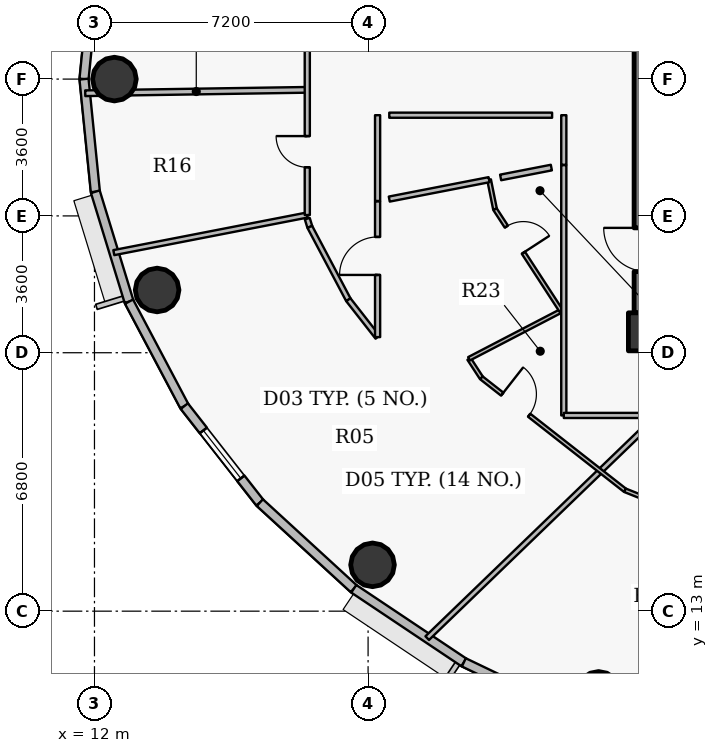
"""IFC4 building model, lengths in metres.
Left out: names, types, materials, properties, quantities, classifications, styles, units other than length and angle.
Written with IfcOpenShell. Run it as: python <this file> out.ifc"""

import sys

from ifc_helpers import new_model, si_unit, direction, frame, frame_2d, origin, origin_2d, place, context, subcontext, project, spatial, rectangle, hollow_circle, extrude, source, transform, mapped, element, fill, save


model = new_model("IFC4")
c1 = context("Model", 3, precision=1e-05, world=origin(), true_north=direction((0.0, 1.0)))
c2 = subcontext(c1, "Body", "Model", "MODEL_VIEW")
j1 = project(units=[si_unit("LENGTHUNIT", "METRE"), si_unit("PLANEANGLEUNIT", "RADIAN")], contexts=[c1])
p1 = place(None, origin())
s1 = spatial("IfcSite", under=j1, at=p1, CompositionType="ELEMENT")
p2 = place(p1, origin())
s2 = spatial("IfcBuilding", under=s1, at=p2, CompositionType="ELEMENT")
p3 = place(p2, frame((0.0, 0.0, 259.05)))
s3 = spatial("IfcBuildingStorey", under=s2, at=p3, CompositionType="ELEMENT", Elevation=259.05)
p4 = place(p3, frame((26.55, 20.35, 0.0), z_axis=(0.0, 0.0, 1.0), x_axis=(1.0, 0.0, 0.0)))
e1 = element("IfcColumn", 1, at=p4, inside=s3, PredefinedType="COLUMN", context=c2, shape_type="SweptSolid", body=[
    extrude(rectangle(XDim=1.0, YDim=1.0, at=origin_2d()), origin(), (0.0, 0.0, 1.0), 3.75),
])
p5 = place(p3, frame((26.55, 20.85, 0.0), z_axis=(0.0, 0.0, 1.0), x_axis=(0.0, 1.0, 0.0)))
e2 = element("IfcWall", 2, at=p5, inside=s3, PredefinedType="SHEAR", context=c2, shape_type="SweptSolid", body=[
    extrude(rectangle(XDim=12.3, YDim=0.7, at=frame_2d((6.15, 0.0))), origin(), (0.0, 0.0, 1.0), 3.0),
])
p6 = place(p5, frame((1.085, 0.0, 0.0)))
e3 = element("IfcOpeningElement", 3, at=p6, cuts=e2, PredefinedType="OPENING", context=c2, shape_type="SweptSolid", body=[
    extrude(rectangle(XDim=1.15, YDim=2.15, at=origin_2d()), frame((0.575, 0.36, 1.075), z_axis=(0.0, -1.0, 0.0), x_axis=(1.0, 0.0, 0.0)), (0.0, 0.0, 1.0), 0.72),
])
for number, where, z_axis, x_axis in (
    (4, (12.525, 27.0, 0.0), (0.0, 0.0, 1.0), (1.0, 0.0, 0.0)),
    (5, (13.649, 21.451, 0.0), (0.0, 0.0, 1.0), (1.0, 0.0, 0.0)),
    (6, (19.317, 14.219, 0.0), (0.0, 0.0, 1.0), (1.0, 0.0, 0.0)),
    (7, (25.265, 10.836, 0.0), (0.0, 0.0, 1.0), (1.0, 0.0, 0.0)),
):
    element("IfcColumn", number, at=place(p3, frame(where, z_axis=z_axis, x_axis=x_axis)), inside=s3, PredefinedType="COLUMN", context=c2, shape_type="SweptSolid", body=[
        extrude(hollow_circle(Radius=0.575, WallThickness=0.036, at=origin_2d()), origin(), (0.0, 0.0, 1.0), 3.75),
    ])
for number, where, z_axis, x_axis in (
    (8, (11.725, 27.0, 0.0), (0.0, 0.0, 1.0), (0.1, 0.995, 0.0)),
    (9, (12.023, 24.036, 0.0), (0.0, 0.0, 1.0), (-0.1, 0.995, 0.0)),
):
    element("IfcWall", number, at=place(p3, frame(where, z_axis=z_axis, x_axis=x_axis)), inside=s3, PredefinedType="SOLIDWALL", context=c2, shape_type="SweptSolid", body=[
        extrude(rectangle(XDim=2.979, YDim=0.24, at=frame_2d((1.489, 0.0))), origin(), (0.0, 0.0, 1.0), 3.45),
    ])
p7 = place(p3, frame((12.91, 21.144, 0.0), z_axis=(0.0, 0.0, 1.0), x_axis=(-0.293132907334, 0.95607170162, 0.0)))
e10 = element("IfcWall", 10, at=p7, inside=s3, PredefinedType="SOLIDWALL", context=c2, shape_type="SweptSolid", body=[
    extrude(rectangle(XDim=3.025, YDim=0.24, at=frame_2d((1.512, 0.0))), origin(), (0.0, 0.0, 1.0), 3.45),
])
p8 = place(p3, frame((14.364, 18.395, 0.0), z_axis=(0.0, 0.0, 1.0), x_axis=(-0.46766049993, 0.883908172157, 0.0)))
e11 = element("IfcWall", 11, at=p8, inside=s3, PredefinedType="SOLIDWALL", context=c2, shape_type="SweptSolid", body=[
    extrude(rectangle(XDim=3.11, YDim=0.24, at=frame_2d((1.555, 0.0))), origin(), (0.0, 0.0, 1.0), 3.45),
])
p9 = place(p3, frame((16.352, 15.855, 0.0), z_axis=(0.0, 0.0, 1.0), x_axis=(-0.616312344705, 0.787501805562, 0.0)))
e12 = element("IfcWall", 12, at=p9, inside=s3, PredefinedType="SOLIDWALL", context=c2, shape_type="SweptSolid", body=[
    extrude(rectangle(XDim=3.225, YDim=0.24, at=frame_2d((1.612, 0.0))), origin(), (0.0, 0.0, 1.0), 3.45),
])
p10 = place(p9, frame((0.812, 0.0, 0.9)))
e13 = element("IfcOpeningElement", 13, at=p10, cuts=e12, PredefinedType="OPENING", context=c2, shape_type="SweptSolid", body=[
    extrude(rectangle(XDim=1.6, YDim=1.75, at=origin_2d()), frame((0.8, 0.13, 0.875), z_axis=(0.0, -1.0, 0.0), x_axis=(1.0, 0.0, 0.0)), (0.0, 0.0, 1.0), 0.26),
])
p11 = place(p3, frame((18.824, 13.589, 0.0), z_axis=(0.0, 0.0, 1.0), x_axis=(-0.737123922599, 0.675757591694, 0.0)))
e14 = element("IfcWall", 14, at=p11, inside=s3, PredefinedType="SOLIDWALL", context=c2, shape_type="SweptSolid", body=[
    extrude(rectangle(XDim=3.354, YDim=0.24, at=frame_2d((1.677, 0.0))), origin(), (0.0, 0.0, 1.0), 3.45),
])
p12 = place(p3, frame((21.72, 11.652, 0.0), z_axis=(0.0, 0.0, 1.0), x_axis=(-0.831262496074, 0.555880079352, 0.0)))
e15 = element("IfcWall", 15, at=p12, inside=s3, PredefinedType="SOLIDWALL", context=c2, shape_type="SweptSolid", body=[
    extrude(rectangle(XDim=3.484, YDim=0.24, at=frame_2d((1.742, 0.0))), origin(), (0.0, 0.0, 1.0), 3.45),
])
p13 = place(p3, frame((24.969, 10.094, 0.0), z_axis=(0.0, 0.0, 1.0), x_axis=(-0.901598104751, 0.432574684313, 0.0)))
e16 = element("IfcWall", 16, at=p13, inside=s3, PredefinedType="SOLIDWALL", context=c2, shape_type="SweptSolid", body=[
    extrude(rectangle(XDim=3.604, YDim=0.24, at=frame_2d((1.802, 0.0))), origin(), (0.0, 0.0, 1.0), 3.45),
])
p14 = place(p3, frame((11.757, 26.628, 0.0), z_axis=(0.0, 0.0, 1.0), x_axis=(0.999882437841, 0.015333313333, 0.0)))
e17 = element("IfcWall", 17, at=p14, inside=s3, PredefinedType="PARTITIONING", context=c2, shape_type="SweptSolid", body=[
    extrude(rectangle(XDim=5.844, YDim=0.15, at=frame_2d((2.922, 0.0))), origin(), (0.0, 0.0, 1.0), 2.935),
])
p15 = place(p3, frame((12.509, 22.434, 0.0), z_axis=(0.0, 0.0, 1.0), x_axis=(0.981630821079, 0.190790280431, 0.0)))
e18 = element("IfcWall", 18, at=p15, inside=s3, PredefinedType="PARTITIONING", context=c2, shape_type="SweptSolid", body=[
    extrude(rectangle(XDim=5.186, YDim=0.135, at=frame_2d((2.593, 0.0))), origin(), (0.0, 0.0, 1.0), 2.935),
])
p16 = place(p3, frame((17.6, 23.328, 0.0), z_axis=(0.0, 0.0, 1.0), x_axis=(0.292875000845, -0.956150738053, 0.0)))
e19 = element("IfcWall", 19, at=p16, inside=s3, PredefinedType="PARTITIONING", context=c2, shape_type="SweptSolid", body=[
    extrude(rectangle(XDim=0.227, YDim=0.135, at=frame_2d((0.113, 0.0))), origin(), (0.0, 0.0, 1.0), 3.45),
])
p17 = place(p3, frame((17.6, 23.423, 0.0), z_axis=(0.0, 0.0, 1.0), x_axis=(0.0, 1.0, 0.0)))
e20 = element("IfcWall", 20, at=p17, inside=s3, PredefinedType="PARTITIONING", context=c2, shape_type="SweptSolid", body=[
    extrude(rectangle(XDim=4.527, YDim=0.135, at=frame_2d((2.263, 0.0))), origin(), (0.0, 0.0, 1.0), 2.885),
])
p18 = place(p17, frame((1.257, 0.0, 0.0)))
e21 = element("IfcOpeningElement", 21, at=p18, cuts=e20, PredefinedType="OPENING", context=c2, shape_type="SweptSolid", body=[
    extrude(rectangle(XDim=0.82, YDim=2.1, at=origin_2d()), frame((0.41, 0.078, 1.05), z_axis=(0.0, -1.0, 0.0), x_axis=(1.0, 0.0, 0.0)), (0.0, 0.0, 1.0), 0.155),
])
p19 = place(p3, frame((17.667, 23.111, 0.0), z_axis=(0.0, 0.0, 1.0), x_axis=(0.467675622269, -0.883900171024, 0.0)))
e22 = element("IfcWall", 22, at=p19, inside=s3, PredefinedType="PARTITIONING", context=c2, shape_type="SweptSolid", body=[
    extrude(rectangle(XDim=2.168, YDim=0.135, at=frame_2d((1.084, 0.0))), origin(), (0.0, 0.0, 1.0), 2.885),
])
p20 = place(p3, frame((18.681, 21.194, 0.0), z_axis=(0.0, 0.0, 1.0), x_axis=(0.616239706802, -0.787558647823, 0.0)))
e23 = element("IfcWall", 23, at=p20, inside=s3, PredefinedType="PARTITIONING", context=c2, shape_type="SweptSolid", body=[
    extrude(rectangle(XDim=1.248, YDim=0.135, at=frame_2d((0.624, 0.0))), origin(), (0.0, 0.0, 1.0), 3.45),
])
p21 = place(p3, frame((19.45, 20.211, 0.0), z_axis=(0.0, 0.0, 1.0), x_axis=(0.0, 1.0, 0.0)))
e24 = element("IfcWall", 24, at=p21, inside=s3, PredefinedType="PARTITIONING", context=c2, shape_type="SweptSolid", body=[
    extrude(rectangle(XDim=3.572, YDim=0.135, at=frame_2d((1.786, 0.0))), origin(), (0.0, 0.0, 1.0), 2.885),
])
p22 = place(p21, frame((1.636, 0.0, 0.0)))
e25 = element("IfcOpeningElement", 25, at=p22, cuts=e24, PredefinedType="OPENING", context=c2, shape_type="SweptSolid", body=[
    extrude(rectangle(XDim=1.0, YDim=2.15, at=origin_2d()), frame((0.5, 0.078, 1.075), z_axis=(0.0, -1.0, 0.0), x_axis=(1.0, 0.0, 0.0)), (0.0, 0.0, 1.0), 0.155),
])
p23 = place(p3, frame((20.756, 12.291, 0.0), z_axis=(0.0, 0.0, 1.0), x_axis=(0.719623273788, 0.694364705196, 0.0)))
e26 = element("IfcWall", 26, at=p23, inside=s3, PredefinedType="PARTITIONING", context=c2, shape_type="SweptSolid", body=[
    extrude(rectangle(XDim=8.438, YDim=0.135, at=frame_2d((4.219, 0.0))), origin(), (0.0, 0.0, 1.0), 2.935),
])
p24 = place(p3, frame((21.856, 19.641, 0.0), z_axis=(0.0, 0.0, 1.0), x_axis=(0.545246536912, -0.838275738636, 0.0)))
e27 = element("IfcWall", 27, at=p24, inside=s3, PredefinedType="PARTITIONING", context=c2, shape_type="SweptSolid", body=[
    extrude(rectangle(XDim=0.598, YDim=0.1, at=frame_2d((0.299, 0.0))), origin(), (0.0, 0.0, 1.0), 3.45),
])
p25 = place(p3, frame((21.856, 19.641, 0.0), z_axis=(0.0, 0.0, 1.0), x_axis=(0.887130502634, 0.461518657582, 0.0)))
e28 = element("IfcWall", 28, at=p25, inside=s3, PredefinedType="PARTITIONING", context=c2, shape_type="SweptSolid", body=[
    extrude(rectangle(XDim=2.733, YDim=0.1, at=frame_2d((1.367, 0.0))), origin(), (0.0, 0.0, 1.0), 3.45),
])
p26 = place(p3, frame((22.182, 19.139, 0.0), z_axis=(0.0, 0.0, 1.0), x_axis=(0.787386902975, -0.616459134917, 0.0)))
e29 = element("IfcWall", 29, at=p26, inside=s3, PredefinedType="PARTITIONING", context=c2, shape_type="SweptSolid", body=[
    extrude(rectangle(XDim=4.799, YDim=0.1, at=frame_2d((2.399, 0.0))), origin(), (0.0, 0.0, 1.0), 2.885),
])
p27 = place(p26, frame((0.695, 0.0, 0.0)))
e30 = element("IfcOpeningElement", 30, at=p27, cuts=e29, PredefinedType="OPENING", context=c2, shape_type="SweptSolid", body=[
    extrude(rectangle(XDim=0.9, YDim=2.1, at=origin_2d()), frame((0.45, 0.06, 1.05), z_axis=(0.0, -1.0, 0.0), x_axis=(1.0, 0.0, 0.0)), (0.0, 0.0, 1.0), 0.12),
])
p28 = place(p3, frame((22.383, 24.353, 0.0), z_axis=(0.0, 0.0, 1.0), x_axis=(0.198542560358, -0.980092266946, 0.0)))
e31 = element("IfcWall", 31, at=p28, inside=s3, PredefinedType="PARTITIONING", context=c2, shape_type="SweptSolid", body=[
    extrude(rectangle(XDim=0.793, YDim=0.1, at=frame_2d((0.396, 0.0))), origin(), (0.0, 0.0, 1.0), 2.885),
])
p29 = place(p3, frame((22.541, 23.576, 0.0), z_axis=(0.0, 0.0, 1.0), x_axis=(0.545375666154, -0.838191733893, 0.0)))
e32 = element("IfcWall", 32, at=p29, inside=s3, PredefinedType="PARTITIONING", context=c2, shape_type="SweptSolid", body=[
    extrude(rectangle(XDim=3.19, YDim=0.1, at=frame_2d((1.595, 0.0))), origin(), (0.0, 0.0, 1.0), 2.885),
])
p30 = place(p29, frame((0.546, 0.0, 0.0)))
e33 = element("IfcOpeningElement", 33, at=p30, cuts=e32, PredefinedType="OPENING", context=c2, shape_type="SweptSolid", body=[
    extrude(rectangle(XDim=0.82, YDim=2.1, at=origin_2d()), frame((0.41, 0.06, 1.05), z_axis=(0.0, -1.0, 0.0), x_axis=(1.0, 0.0, 0.0)), (0.0, 0.0, 1.0), 0.12),
])
p31 = place(p3, frame((24.35, 18.15, 0.0), z_axis=(0.0, 0.0, 1.0), x_axis=(0.0, 1.0, 0.0)))
e34 = element("IfcWall", 34, at=p31, inside=s3, PredefinedType="PARTITIONING", context=c2, shape_type="SweptSolid", body=[
    extrude(rectangle(XDim=6.585, YDim=0.135, at=frame_2d((3.293, 0.0))), origin(), (0.0, 0.0, 1.0), 2.885),
])
p32 = place(p3, frame((24.35, 18.15, 0.0), z_axis=(0.0, 0.0, 1.0), x_axis=(1.0, 0.0, 0.0)))
e35 = element("IfcWall", 35, at=p32, inside=s3, PredefinedType="PARTITIONING", context=c2, shape_type="SweptSolid", body=[
    extrude(rectangle(XDim=23.85, YDim=0.135, at=frame_2d((11.925, 0.0))), origin(), (0.0, 0.0, 1.0), 2.885),
])
p33 = place(p32, frame((6.069, 0.0, 0.0)))
e36 = element("IfcOpeningElement", 36, at=p33, cuts=e35, PredefinedType="OPENING", context=c2, shape_type="SweptSolid", body=[
    extrude(rectangle(XDim=1.0, YDim=2.15, at=origin_2d()), frame((0.5, 0.078, 1.075), z_axis=(0.0, -1.0, 0.0), x_axis=(1.0, 0.0, 0.0)), (0.0, 0.0, 1.0), 0.155),
])
p34 = place(p32, frame((19.505, 0.0, 0.0)))
e37 = element("IfcOpeningElement", 37, at=p34, cuts=e35, PredefinedType="OPENING", context=c2, shape_type="SweptSolid", body=[
    extrude(rectangle(XDim=1.0, YDim=2.15, at=origin_2d()), frame((0.5, 0.078, 1.075), z_axis=(0.0, -1.0, 0.0), x_axis=(1.0, 0.0, 0.0)), (0.0, 0.0, 1.0), 0.155),
])
p35 = place(p3, frame((25.961, 16.181, 0.0), z_axis=(0.0, 0.0, 1.0), x_axis=(0.928801505367, -0.370577608105, 0.0)))
e38 = element("IfcWall", 38, at=p35, inside=s3, PredefinedType="PARTITIONING", context=c2, shape_type="SweptSolid", body=[
    extrude(rectangle(XDim=5.126, YDim=0.1, at=frame_2d((2.563, 0.0))), origin(), (0.0, 0.0, 1.0), 2.885),
])
p36 = place(p3, frame((19.45, 26.05, 0.0), z_axis=(0.0, 0.0, 1.0), x_axis=(0.0, -1.0, 0.0)))
e39 = element("IfcWall", 39, at=p36, inside=s3, PredefinedType="PARTITIONING", context=c2, shape_type="SweptSolid", body=[
    extrude(rectangle(XDim=2.257, YDim=0.135, at=frame_2d((1.128, 0.0))), origin(), (0.0, 0.0, 1.0), 3.45),
])
p37 = place(p3, frame((26.2, 20.84, 0.0), z_axis=(0.0, 0.0, 1.0), x_axis=(0.0, -1.0, 0.0)))
e40 = element("IfcWall", 40, at=p37, inside=s3, PredefinedType="PARTITIONING", context=c2, shape_type="SweptSolid", body=[
    extrude(rectangle(XDim=0.84, YDim=0.135, at=frame_2d((0.42, 0.0))), origin(), (0.0, 0.0, 1.0), 3.45),
])
p38 = place(p3, frame((24.35, 24.745, 0.0), z_axis=(0.0, 0.0, 1.0), x_axis=(0.0, 1.0, 0.0)))
e41 = element("IfcWall", 41, at=p38, inside=s3, PredefinedType="PARTITIONING", context=c2, shape_type="SweptSolid", body=[
    extrude(rectangle(XDim=1.305, YDim=0.135, at=frame_2d((0.652, 0.0))), origin(), (0.0, 0.0, 1.0), 3.45),
])
p39 = place(p3, frame((24.042, 26.05, 0.0), z_axis=(0.0, 0.0, 1.0), x_axis=(-1.0, 0.0, 0.0)))
e42 = element("IfcWall", 42, at=p39, inside=s3, PredefinedType="PARTITIONING", context=c2, shape_type="SweptSolid", body=[
    extrude(rectangle(XDim=4.285, YDim=0.135, at=frame_2d((2.143, 0.0))), origin(), (0.0, 0.0, 1.0), 3.45),
])
p40 = place(p3, frame((22.688, 24.412, 0.0), z_axis=(0.0, 0.0, 1.0), x_axis=(0.981616324133, 0.19086485322, 0.0)))
e43 = element("IfcWall", 43, at=p40, inside=s3, PredefinedType="PARTITIONING", context=c2, shape_type="SweptSolid", body=[
    extrude(rectangle(XDim=1.36, YDim=0.15, at=frame_2d((0.68, 0.0))), origin(), (0.0, 0.0, 1.0), 3.45),
])
p41 = place(p3, frame((19.758, 23.843, 0.0), z_axis=(0.0, 0.0, 1.0), x_axis=(0.98161966457, 0.190847672582, 0.0)))
e44 = element("IfcWall", 44, at=p41, inside=s3, PredefinedType="PARTITIONING", context=c2, shape_type="SweptSolid", body=[
    extrude(rectangle(XDim=2.675, YDim=0.135, at=frame_2d((1.337, 0.0))), origin(), (0.0, 0.0, 1.0), 3.45),
])
m1 = source(origin(), c2, "Body", "SweptSolid", [
    extrude(rectangle(XDim=1.6, YDim=1.75, at=origin_2d()), frame((0.8, 0.03, 0.875), z_axis=(0.0, -1.0, 0.0), x_axis=(1.0, 0.0, 0.0)), (0.0, 0.0, 1.0), 0.06),
])
p42 = place(p10, origin())
e45 = element("IfcWindow", 45, at=p42, inside=s3, PartitioningType="DOUBLE_PANEL_VERTICAL", PredefinedType="WINDOW", context=c2, shape_type="MappedRepresentation", body=[
    mapped(m1, transform((0.0, 0.0, 0.0), x_axis=(1.0, 0.0, 0.0), y_axis=(0.0, 1.0, 0.0), z_axis=(0.0, 0.0, 1.0), scale=1.0)),
])
fill(e13, e45)
m2 = source(origin(), c2, "Body", "SweptSolid", [
    extrude(rectangle(XDim=1.0, YDim=2.15, at=origin_2d()), frame((0.5, 0.025, 1.075), z_axis=(0.0, -1.0, 0.0), x_axis=(1.0, 0.0, 0.0)), (0.0, 0.0, 1.0), 0.05),
])
p43 = place(p22, origin())
e46 = element("IfcDoor", 46, at=p43, inside=s3, OperationType="SINGLE_SWING_LEFT", PredefinedType="DOOR", context=c2, shape_type="MappedRepresentation", body=[
    mapped(m2, transform((0.0, 0.0, 0.0), x_axis=(1.0, 0.0, 0.0), y_axis=(0.0, 1.0, 0.0), z_axis=(0.0, 0.0, 1.0), scale=1.0)),
])
fill(e25, e46)
m3 = source(origin(), c2, "Body", "SweptSolid", [
    extrude(rectangle(XDim=0.82, YDim=2.1, at=origin_2d()), frame((0.41, 0.025, 1.05), z_axis=(0.0, -1.0, 0.0), x_axis=(1.0, 0.0, 0.0)), (0.0, 0.0, 1.0), 0.05),
])
p44 = place(p30, origin())
e47 = element("IfcDoor", 47, at=p44, inside=s3, OperationType="SINGLE_SWING_RIGHT", PredefinedType="DOOR", context=c2, shape_type="MappedRepresentation", body=[
    mapped(m3, transform((0.0, 0.0, 0.0), x_axis=(1.0, 0.0, 0.0), y_axis=(0.0, 1.0, 0.0), z_axis=(0.0, 0.0, 1.0), scale=1.0)),
])
fill(e33, e47)
m4 = source(origin(), c2, "Body", "SweptSolid", [
    extrude(rectangle(XDim=0.9, YDim=2.1, at=origin_2d()), frame((0.45, 0.025, 1.05), z_axis=(0.0, -1.0, 0.0), x_axis=(1.0, 0.0, 0.0)), (0.0, 0.0, 1.0), 0.05),
])
p45 = place(p27, origin())
e48 = element("IfcDoor", 48, at=p45, inside=s3, OperationType="SINGLE_SWING_LEFT", PredefinedType="DOOR", context=c2, shape_type="MappedRepresentation", body=[
    mapped(m4, transform((0.0, 0.0, 0.0), x_axis=(1.0, 0.0, 0.0), y_axis=(0.0, 1.0, 0.0), z_axis=(0.0, 0.0, 1.0), scale=1.0)),
])
fill(e30, e48)
p46 = place(p18, origin())
e49 = element("IfcDoor", 49, at=p46, inside=s3, OperationType="SINGLE_SWING_RIGHT", PredefinedType="DOOR", context=c2, shape_type="MappedRepresentation", body=[
    mapped(m3, transform((0.0, 0.0, 0.0), x_axis=(1.0, 0.0, 0.0), y_axis=(0.0, 1.0, 0.0), z_axis=(0.0, 0.0, 1.0), scale=1.0)),
])
fill(e21, e49)
save(model, sys.argv[1])
